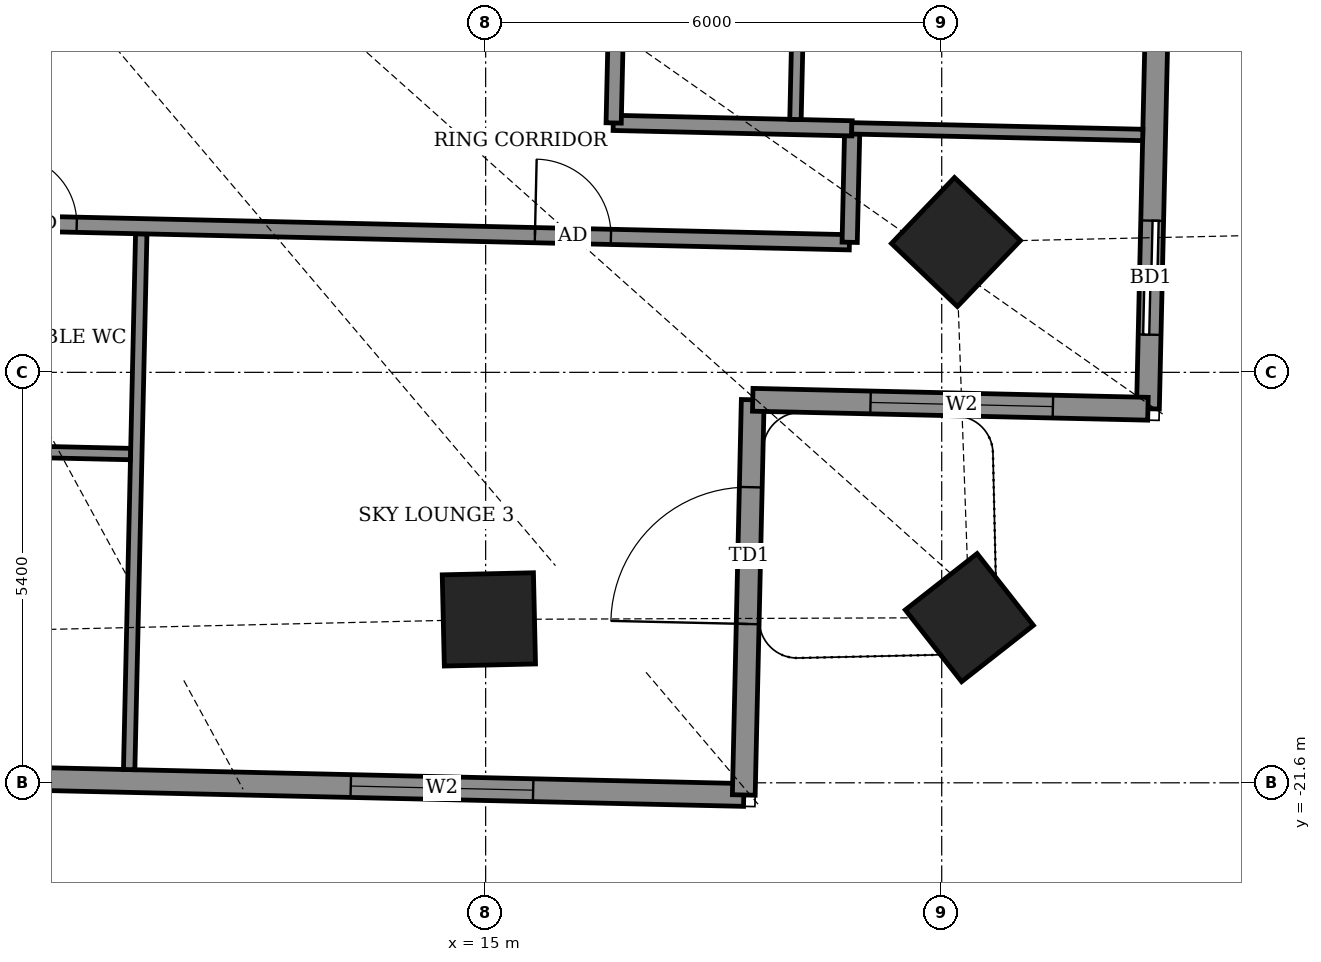
"""IFC4 building model, lengths in metres.
Left out: names, types, materials, properties, quantities, classifications, styles, units other than length and angle.
Written with IfcOpenShell. Run it as: python <this file> out.ifc"""

import sys

from ifc_helpers import new_model, si_unit, direction, frame, frame_2d, origin, origin_2d, place, context, subcontext, project, spatial, rectangle, extrude, element, fill, save


model = new_model("IFC4")
c1 = context("Model", 3, precision=1e-05, world=origin(), true_north=direction((0.0, 1.0)))
c2 = subcontext(c1, "Body", "Model", "MODEL_VIEW")
j1 = project(units=[si_unit("LENGTHUNIT", "METRE"), si_unit("PLANEANGLEUNIT", "RADIAN")], contexts=[c1])
p1 = place(None, origin())
s1 = spatial("IfcSite", under=j1, at=p1, CompositionType="ELEMENT")
p2 = place(p1, origin())
s2 = spatial("IfcBuilding", under=s1, at=p2, CompositionType="ELEMENT")
p3 = place(p2, frame((0.0, 0.0, 193.3)))
s3 = spatial("IfcBuildingStorey", under=s2, at=p3, CompositionType="ELEMENT", Elevation=193.3)
for number, where, z_axis, x_axis in (
    (1, (15.042, -19.45, -0.55), (0.0, 0.0, 1.0), (1.0, 0.023, 0.0)),
    (2, (21.364, -19.427, -0.55), (0.0, 0.0, 1.0), (0.787, 0.617, 0.0)),
    (3, (21.187, -14.486, -0.55), (0.0, 0.0, 1.0), (0.691, 0.723, 0.0)),
):
    element("IfcColumn", number, at=place(p3, frame(where, z_axis=z_axis, x_axis=x_axis)), inside=s3, PredefinedType="COLUMN", context=c2, shape_type="SweptSolid", body=[
        extrude(rectangle(XDim=1.2, YDim=1.2, at=origin_2d()), origin(), (0.0, 0.0, 1.0), 4.6),
    ])
p4 = place(p3, frame((23.713, -16.679, 0.0), z_axis=(0.0, 0.0, 1.0), x_axis=(0.02269451316, 0.999742446369, 0.0)))
e4 = element("IfcWall", 4, at=p4, inside=s3, PredefinedType="SOLIDWALL", context=c2, shape_type="SweptSolid", body=[
    extrude(rectangle(XDim=10.93, YDim=0.3, at=frame_2d((5.465, 0.0))), origin(), (0.0, 0.0, 1.0), 2.65),
])
p5 = place(p4, frame((0.975, 0.0, 0.0)))
e5 = element("IfcOpeningElement", 5, at=p5, cuts=e4, PredefinedType="OPENING", context=c2, shape_type="SweptSolid", body=[
    extrude(rectangle(XDim=1.5, YDim=2.4, at=frame_2d((0.75, 1.2))), frame((0.0, 0.16, 0.0), z_axis=(0.0, -1.0, 0.0), x_axis=(1.0, 0.0, 0.0)), (0.0, 0.0, 1.0), 0.32),
])
p6 = place(p4, frame((5.37, 0.0, 0.0)))
e6 = element("IfcOpeningElement", 6, at=p6, cuts=e4, PredefinedType="OPENING", context=c2, shape_type="SweptSolid", body=[
    extrude(rectangle(XDim=1.5, YDim=2.4, at=frame_2d((0.75, 1.2))), frame((0.0, 0.16, 0.0), z_axis=(0.0, -1.0, 0.0), x_axis=(1.0, 0.0, 0.0)), (0.0, 0.0, 1.0), 0.32),
])
p7 = place(p3, frame((-23.437, -20.81, 0.0), z_axis=(0.0, 0.0, 1.0), x_axis=(0.999742269115, -0.022702320244, 0.0)))
e7 = element("IfcWall", 7, at=p7, inside=s3, PredefinedType="SOLIDWALL", context=c2, shape_type="SweptSolid", body=[
    extrude(rectangle(XDim=41.844, YDim=0.3, at=frame_2d((20.922, 0.0))), origin(), (0.0, 0.0, 1.0), 2.65),
])
p8 = place(p7, frame((1.589, 0.0, 0.0)))
e8 = element("IfcOpeningElement", 8, at=p8, cuts=e7, PredefinedType="OPENING", context=c2, shape_type="SweptSolid", body=[
    extrude(rectangle(XDim=1.5, YDim=2.4, at=frame_2d((0.75, 1.2))), frame((0.0, 0.16, 0.0), z_axis=(0.0, -1.0, 0.0), x_axis=(1.0, 0.0, 0.0)), (0.0, 0.0, 1.0), 0.32),
])
p9 = place(p7, frame((13.061, 0.0, 0.9)))
e9 = element("IfcOpeningElement", 9, at=p9, cuts=e7, PredefinedType="OPENING", context=c2, shape_type="SweptSolid", body=[
    extrude(rectangle(XDim=2.4, YDim=1.5, at=frame_2d((1.2, 0.75))), frame((0.0, 0.16, 0.0), z_axis=(0.0, -1.0, 0.0), x_axis=(1.0, 0.0, 0.0)), (0.0, 0.0, 1.0), 0.32),
])
p10 = place(p7, frame((19.323, 0.0, 0.0)))
e10 = element("IfcOpeningElement", 10, at=p10, cuts=e7, PredefinedType="OPENING", context=c2, shape_type="SweptSolid", body=[
    extrude(rectangle(XDim=1.5, YDim=2.4, at=frame_2d((0.75, 1.2))), frame((0.0, 0.16, 0.0), z_axis=(0.0, -1.0, 0.0), x_axis=(1.0, 0.0, 0.0)), (0.0, 0.0, 1.0), 0.32),
])
p11 = place(p7, frame((22.283, 0.0, 0.0)))
e11 = element("IfcOpeningElement", 11, at=p11, cuts=e7, PredefinedType="OPENING", context=c2, shape_type="SweptSolid", body=[
    extrude(rectangle(XDim=1.5, YDim=2.4, at=frame_2d((0.75, 1.2))), frame((0.0, 0.16, 0.0), z_axis=(0.0, -1.0, 0.0), x_axis=(1.0, 0.0, 0.0)), (0.0, 0.0, 1.0), 0.32),
])
p12 = place(p7, frame((28.825, 0.0, 0.9)))
e12 = element("IfcOpeningElement", 12, at=p12, cuts=e7, PredefinedType="OPENING", context=c2, shape_type="SweptSolid", body=[
    extrude(rectangle(XDim=2.4, YDim=1.5, at=frame_2d((1.2, 0.75))), frame((0.0, 0.16, 0.0), z_axis=(0.0, -1.0, 0.0), x_axis=(1.0, 0.0, 0.0)), (0.0, 0.0, 1.0), 0.32),
])
p13 = place(p7, frame((36.672, 0.0, 0.9)))
e13 = element("IfcOpeningElement", 13, at=p13, cuts=e7, PredefinedType="OPENING", context=c2, shape_type="SweptSolid", body=[
    extrude(rectangle(XDim=2.4, YDim=1.5, at=frame_2d((1.2, 0.75))), frame((0.0, 0.16, 0.0), z_axis=(0.0, -1.0, 0.0), x_axis=(1.0, 0.0, 0.0)), (0.0, 0.0, 1.0), 0.32),
])
p14 = place(p3, frame((18.396, -21.76, 0.0), z_axis=(0.0, 0.0, 1.0), x_axis=(0.022675548694, 0.99974287669, 0.0)))
e14 = element("IfcWall", 14, at=p14, inside=s3, PredefinedType="SOLIDWALL", context=c2, shape_type="SweptSolid", body=[
    extrude(rectangle(XDim=5.2, YDim=0.3, at=frame_2d((2.6, 0.0))), origin(), (0.0, 0.0, 1.0), 2.65),
])
p15 = place(p14, frame((2.25, 0.0, 0.0)))
e15 = element("IfcOpeningElement", 15, at=p15, cuts=e14, PredefinedType="OPENING", context=c2, shape_type="SweptSolid", body=[
    extrude(rectangle(XDim=1.8, YDim=2.4, at=frame_2d((0.9, 1.2))), frame((0.0, 0.16, 0.0), z_axis=(0.0, -1.0, 0.0), x_axis=(1.0, 0.0, 0.0)), (0.0, 0.0, 1.0), 0.32),
])
p16 = place(p3, frame((18.514, -16.561, 0.0), z_axis=(0.0, 0.0, 1.0), x_axis=(0.99974287669, -0.022675548694, 0.0)))
e16 = element("IfcWall", 16, at=p16, inside=s3, PredefinedType="SOLIDWALL", context=c2, shape_type="SweptSolid", body=[
    extrude(rectangle(XDim=5.2, YDim=0.3, at=frame_2d((2.6, 0.0))), origin(), (0.0, 0.0, 1.0), 2.65),
])
p17 = place(p16, frame((1.55, 0.0, 0.9)))
e17 = element("IfcOpeningElement", 17, at=p17, cuts=e16, PredefinedType="OPENING", context=c2, shape_type="SweptSolid", body=[
    extrude(rectangle(XDim=2.4, YDim=1.5, at=frame_2d((1.2, 0.75))), frame((0.0, 0.16, 0.0), z_axis=(0.0, -1.0, 0.0), x_axis=(1.0, 0.0, 0.0)), (0.0, 0.0, 1.0), 0.32),
])
p18 = place(p3, frame((10.31, -21.426, 0.0), z_axis=(0.0, 0.0, 1.0), x_axis=(0.022544409002, 0.999745842513, 0.0)))
e18 = element("IfcWall", 18, at=p18, inside=s3, PredefinedType="PARTITIONING", context=c2, shape_type="SweptSolid", body=[
    extrude(rectangle(XDim=7.05, YDim=0.15, at=frame_2d((3.525, 0.0))), origin(), (0.0, 0.0, 1.0), 2.65),
])
p19 = place(p3, frame((7.802, -17.218, 0.0), z_axis=(0.0, 0.0, 1.0), x_axis=(0.999746307581, -0.022523775833, 0.0)))
e19 = element("IfcWall", 19, at=p19, inside=s3, PredefinedType="PARTITIONING", context=c2, shape_type="SweptSolid", body=[
    extrude(rectangle(XDim=2.526, YDim=0.15, at=frame_2d((1.263, 0.0))), origin(), (0.0, 0.0, 1.0), 2.85),
])
p20 = place(p3, frame((-17.718, -13.638, 0.0), z_axis=(0.0, 0.0, 1.0), x_axis=(0.999742614446, -0.022687107814, 0.0)))
e20 = element("IfcWall", 20, at=p20, inside=s3, PredefinedType="PARTITIONING", context=c2, shape_type="SweptSolid", body=[
    extrude(rectangle(XDim=37.514, YDim=0.2, at=frame_2d((18.757, 0.0))), origin(), (0.0, 0.0, 1.0), 2.85),
])
p21 = place(p20, frame((7.37, 0.0, 0.0)))
e21 = element("IfcOpeningElement", 21, at=p21, cuts=e20, PredefinedType="OPENING", context=c2, shape_type="SweptSolid", body=[
    extrude(rectangle(XDim=1.0, YDim=2.1, at=frame_2d((0.5, 1.05))), frame((0.0, 0.11, 0.0), z_axis=(0.0, -1.0, 0.0), x_axis=(1.0, 0.0, 0.0)), (0.0, 0.0, 1.0), 0.22),
])
p22 = place(p20, frame((3.295, 0.0, 0.0)))
e22 = element("IfcOpeningElement", 22, at=p22, cuts=e20, PredefinedType="OPENING", context=c2, shape_type="SweptSolid", body=[
    extrude(rectangle(XDim=0.9, YDim=2.1, at=frame_2d((0.45, 1.05))), frame((0.0, 0.11, 0.0), z_axis=(0.0, -1.0, 0.0), x_axis=(1.0, 0.0, 0.0)), (0.0, 0.0, 1.0), 0.22),
])
p23 = place(p20, frame((11.645, 0.0, 0.0)))
e23 = element("IfcOpeningElement", 23, at=p23, cuts=e20, PredefinedType="OPENING", context=c2, shape_type="SweptSolid", body=[
    extrude(rectangle(XDim=0.9, YDim=2.1, at=frame_2d((0.45, 1.05))), frame((0.0, 0.11, 0.0), z_axis=(0.0, -1.0, 0.0), x_axis=(1.0, 0.0, 0.0)), (0.0, 0.0, 1.0), 0.22),
])
p24 = place(p20, frame((19.02, 0.0, 0.0)))
e24 = element("IfcOpeningElement", 24, at=p24, cuts=e20, PredefinedType="OPENING", context=c2, shape_type="SweptSolid", body=[
    extrude(rectangle(XDim=0.9, YDim=2.1, at=frame_2d((0.45, 1.05))), frame((0.0, 0.11, 0.0), z_axis=(0.0, -1.0, 0.0), x_axis=(1.0, 0.0, 0.0)), (0.0, 0.0, 1.0), 0.22),
])
p25 = place(p20, frame((22.67, 0.0, 0.0)))
e25 = element("IfcOpeningElement", 25, at=p25, cuts=e20, PredefinedType="OPENING", context=c2, shape_type="SweptSolid", body=[
    extrude(rectangle(XDim=1.0, YDim=2.1, at=frame_2d((0.5, 1.05))), frame((0.0, 0.11, 0.0), z_axis=(0.0, -1.0, 0.0), x_axis=(1.0, 0.0, 0.0)), (0.0, 0.0, 1.0), 0.22),
])
p26 = place(p20, frame((26.445, 0.0, 0.0)))
e26 = element("IfcOpeningElement", 26, at=p26, cuts=e20, PredefinedType="OPENING", context=c2, shape_type="SweptSolid", body=[
    extrude(rectangle(XDim=0.9, YDim=2.1, at=frame_2d((0.45, 1.05))), frame((0.0, 0.11, 0.0), z_axis=(0.0, -1.0, 0.0), x_axis=(1.0, 0.0, 0.0)), (0.0, 0.0, 1.0), 0.22),
])
p27 = place(p20, frame((33.375, 0.0, 0.0)))
e27 = element("IfcOpeningElement", 27, at=p27, cuts=e20, PredefinedType="OPENING", context=c2, shape_type="SweptSolid", body=[
    extrude(rectangle(XDim=1.0, YDim=2.1, at=frame_2d((0.5, 1.05))), frame((0.0, 0.11, 0.0), z_axis=(0.0, -1.0, 0.0), x_axis=(1.0, 0.0, 0.0)), (0.0, 0.0, 1.0), 0.22),
])
p28 = place(p3, frame((19.789, -14.489, 0.0), z_axis=(0.0, 0.0, 1.0), x_axis=(0.022632637625, 0.99974384905, 0.0)))
e28 = element("IfcWall", 28, at=p28, inside=s3, PredefinedType="PARTITIONING", context=c2, shape_type="SweptSolid", body=[
    extrude(rectangle(XDim=1.5, YDim=0.2, at=frame_2d((0.75, 0.0))), origin(), (0.0, 0.0, 1.0), 2.85),
])
p29 = place(p3, frame((16.679, -12.918, 0.0), z_axis=(0.0, 0.0, 1.0), x_axis=(0.999737242123, -0.02292262447, 0.0)))
e29 = element("IfcWall", 29, at=p29, inside=s3, PredefinedType="PARTITIONING", context=c2, shape_type="SweptSolid", body=[
    extrude(rectangle(XDim=3.142, YDim=0.2, at=frame_2d((1.571, 0.0))), origin(), (0.0, 0.0, 1.0), 2.85),
])
p30 = place(p3, frame((16.684, -12.919, 0.0), z_axis=(0.0, 0.0, 1.0), x_axis=(0.022667483124, 0.999743059595, 0.0)))
e30 = element("IfcWall", 30, at=p30, inside=s3, PredefinedType="PARTITIONING", context=c2, shape_type="SweptSolid", body=[
    extrude(rectangle(XDim=5.245, YDim=0.2, at=frame_2d((2.623, 0.0))), origin(), (0.0, 0.0, 1.0), 2.85),
])
p31 = place(p30, frame((3.27, 0.0, 0.0)))
e31 = element("IfcOpeningElement", 31, at=p31, cuts=e30, PredefinedType="OPENING", context=c2, shape_type="SweptSolid", body=[
    extrude(rectangle(XDim=0.9, YDim=2.1, at=frame_2d((0.45, 1.05))), frame((0.0, 0.11, 0.0), z_axis=(0.0, -1.0, 0.0), x_axis=(1.0, 0.0, 0.0)), (0.0, 0.0, 1.0), 0.22),
])
p32 = place(p3, frame((19.076, -12.873, 0.0), z_axis=(0.0, 0.0, 1.0), x_axis=(0.022603288534, 0.999744513037, 0.0)))
e32 = element("IfcWall", 32, at=p32, inside=s3, PredefinedType="PARTITIONING", context=c2, shape_type="SweptSolid", body=[
    extrude(rectangle(XDim=2.301, YDim=0.15, at=frame_2d((1.15, 0.0))), origin(), (0.0, 0.0, 1.0), 2.85),
])
p33 = place(p3, frame((19.816, -12.99, 0.0), z_axis=(0.0, 0.0, 1.0), x_axis=(0.999742493286, -0.02269244629, 0.0)))
e33 = element("IfcWall", 33, at=p33, inside=s3, PredefinedType="PARTITIONING", context=c2, shape_type="SweptSolid", body=[
    extrude(rectangle(XDim=3.83, YDim=0.15, at=frame_2d((1.915, 0.0))), origin(), (0.0, 0.0, 1.0), 2.85),
])
p34 = place(p5, origin())
e34 = element("IfcDoor", 34, at=p34, inside=s3, OperationType="SLIDING_TO_LEFT", PredefinedType="DOOR", context=c2, shape_type="SweptSolid", body=[
    extrude(rectangle(XDim=1.5, YDim=2.4, at=frame_2d((0.75, 1.2))), frame((0.0, 0.025, 0.0), z_axis=(0.0, -1.0, 0.0), x_axis=(1.0, 0.0, 0.0)), (0.0, 0.0, 1.0), 0.05),
])
fill(e5, e34)
p35 = place(p13, origin())
e35 = element("IfcWindow", 35, at=p35, inside=s3, PartitioningType="DOUBLE_PANEL_VERTICAL", PredefinedType="WINDOW", context=c2, shape_type="SweptSolid", body=[
    extrude(rectangle(XDim=2.4, YDim=1.5, at=frame_2d((1.2, 0.75))), frame((0.0, 0.03, 0.0), z_axis=(0.0, -1.0, 0.0), x_axis=(1.0, 0.0, 0.0)), (0.0, 0.0, 1.0), 0.06),
])
fill(e13, e35)
p36 = place(p15, origin())
e36 = element("IfcDoor", 36, at=p36, inside=s3, OperationType="DOUBLE_DOOR_SINGLE_SWING", PredefinedType="DOOR", context=c2, shape_type="SweptSolid", body=[
    extrude(rectangle(XDim=1.8, YDim=2.4, at=frame_2d((0.9, 1.2))), frame((0.0, 0.025, 0.0), z_axis=(0.0, -1.0, 0.0), x_axis=(1.0, 0.0, 0.0)), (0.0, 0.0, 1.0), 0.05),
])
fill(e15, e36)
p37 = place(p17, origin())
e37 = element("IfcWindow", 37, at=p37, inside=s3, PartitioningType="DOUBLE_PANEL_VERTICAL", PredefinedType="WINDOW", context=c2, shape_type="SweptSolid", body=[
    extrude(rectangle(XDim=2.4, YDim=1.5, at=frame_2d((1.2, 0.75))), frame((0.0, 0.03, 0.0), z_axis=(0.0, -1.0, 0.0), x_axis=(1.0, 0.0, 0.0)), (0.0, 0.0, 1.0), 0.06),
])
fill(e17, e37)
p38 = place(p26, origin())
e38 = element("IfcDoor", 38, at=p38, inside=s3, OperationType="SINGLE_SWING_RIGHT", PredefinedType="DOOR", context=c2, shape_type="SweptSolid", body=[
    extrude(rectangle(XDim=0.9, YDim=2.1, at=frame_2d((0.45, 1.05))), frame((0.0, 0.025, 0.0), z_axis=(0.0, -1.0, 0.0), x_axis=(1.0, 0.0, 0.0)), (0.0, 0.0, 1.0), 0.05),
])
fill(e26, e38)
p39 = place(p27, origin())
e39 = element("IfcDoor", 39, at=p39, inside=s3, OperationType="SINGLE_SWING_RIGHT", PredefinedType="DOOR", context=c2, shape_type="SweptSolid", body=[
    extrude(rectangle(XDim=1.0, YDim=2.1, at=frame_2d((0.5, 1.05))), frame((0.0, 0.025, 0.0), z_axis=(0.0, -1.0, 0.0), x_axis=(1.0, 0.0, 0.0)), (0.0, 0.0, 1.0), 0.05),
])
fill(e27, e39)
save(model, sys.argv[1])
